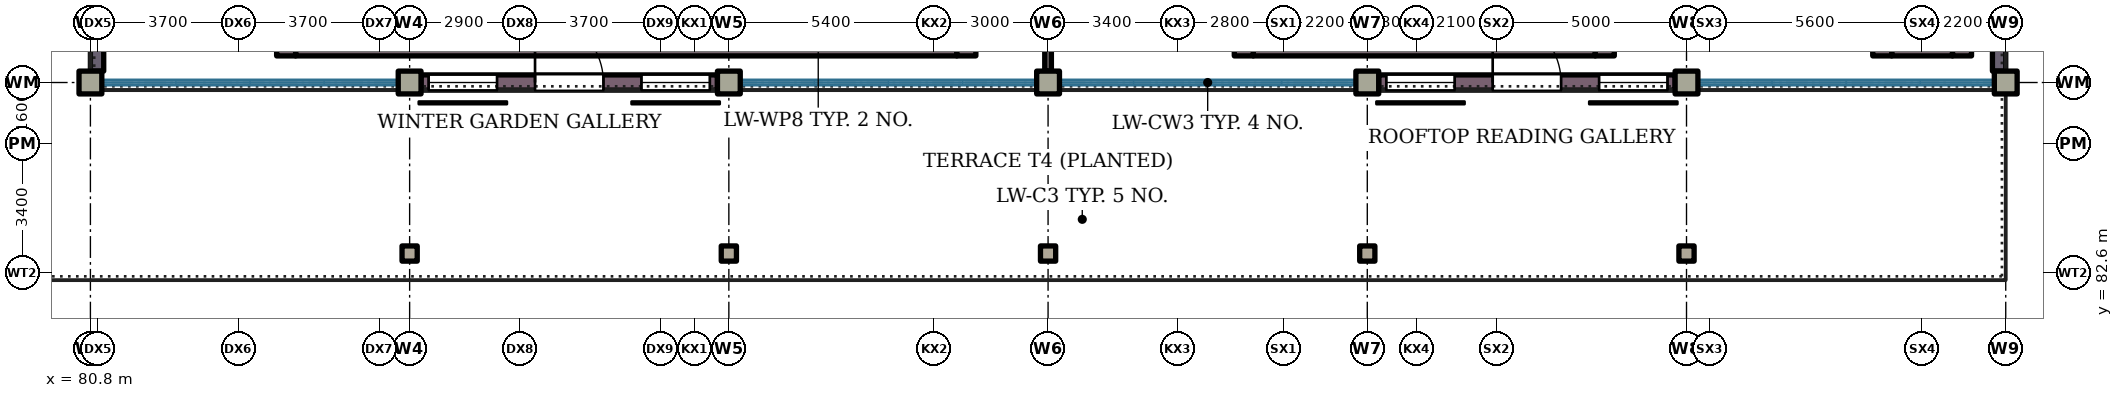
"""IFC4 building model, lengths in metres.
Left out: names, types, materials, properties, quantities, classifications, styles, units other than length and angle.
Written with IfcOpenShell. Run it as: python <this file> out.ifc"""

import sys

from ifc_helpers import new_model, si_unit, direction, frame, frame_2d, origin, origin_2d, place, context, subcontext, project, spatial, rectangle, extrude, element, fill, save


model = new_model("IFC4")
c1 = context("Model", 3, precision=1e-05, world=origin(), true_north=direction((0.0, 1.0)))
c2 = subcontext(c1, "Body", "Model", "MODEL_VIEW")
j1 = project(units=[si_unit("LENGTHUNIT", "METRE"), si_unit("PLANEANGLEUNIT", "RADIAN")], contexts=[c1])
p1 = place(None, origin())
s1 = spatial("IfcSite", under=j1, at=p1, CompositionType="ELEMENT")
p2 = place(p1, origin())
s2 = spatial("IfcBuilding", under=s1, at=p2, CompositionType="ELEMENT")
p3 = place(p2, frame((0.0, 0.0, 16.8)))
s3 = spatial("IfcBuildingStorey", under=s2, at=p3, CompositionType="ELEMENT", Elevation=16.8)
for number, where, z_axis, x_axis in (
    (1, (80.8, 87.6, 0.0), (0.0, 0.0, 1.0), (1.0, 0.0, 0.0)),
    (2, (89.2, 87.6, 0.0), (0.0, 0.0, 1.0), (1.0, 0.0, 0.0)),
    (3, (97.6, 87.6, 0.0), (0.0, 0.0, 1.0), (1.0, 0.0, 0.0)),
    (4, (106.0, 87.6, 0.0), (0.0, 0.0, 1.0), (1.0, 0.0, 0.0)),
    (5, (114.4, 87.6, 0.0), (0.0, 0.0, 1.0), (1.0, 0.0, 0.0)),
    (6, (122.8, 87.6, 0.0), (0.0, 0.0, 1.0), (1.0, 0.0, 0.0)),
    (7, (131.2, 87.6, 0.0), (0.0, 0.0, 1.0), (1.0, 0.0, 0.0)),
):
    element("IfcColumn", number, at=place(p3, frame(where, z_axis=z_axis, x_axis=x_axis)), inside=s3, PredefinedType="COLUMN", context=c2, shape_type="SweptSolid", body=[
        extrude(rectangle(XDim=0.6, YDim=0.6, at=origin_2d()), origin(), (0.0, 0.0, 1.0), 4.2),
    ])
p4 = place(p3, frame((80.975, 87.9, 0.0), z_axis=(0.0, 0.0, 1.0), x_axis=(0.0, 1.0, 0.0)))
e8 = element("IfcWall", 8, at=p4, inside=s3, PredefinedType="SHEAR", context=c2, shape_type="SweptSolid", body=[
    extrude(rectangle(XDim=9.6, YDim=0.35, at=frame_2d((4.8, 0.0))), origin(), (0.0, 0.0, 1.0), 4.2),
])
p5 = place(p4, frame((5.3, 0.0, 0.9)))
e9 = element("IfcOpeningElement", 9, at=p5, cuts=e8, PredefinedType="OPENING", context=c2, shape_type="SweptSolid", body=[
    extrude(rectangle(XDim=1.8, YDim=2.1, at=frame_2d((0.9, 1.05))), frame((0.0, 0.185, 0.0), z_axis=(0.0, -1.0, 0.0), x_axis=(1.0, 0.0, 0.0)), (0.0, 0.0, 1.0), 0.37),
])
p6 = place(p3, frame((131.025, 97.5, 0.0), z_axis=(0.0, 0.0, 1.0), x_axis=(0.0, -1.0, 0.0)))
e10 = element("IfcWall", 10, at=p6, inside=s3, PredefinedType="SHEAR", context=c2, shape_type="SweptSolid", body=[
    extrude(rectangle(XDim=9.6, YDim=0.35, at=frame_2d((4.8, 0.0))), origin(), (0.0, 0.0, 1.0), 4.2),
])
p7 = place(p3, frame((89.5, 87.6, 0.0), z_axis=(0.0, 0.0, 1.0), x_axis=(1.0, 0.0, 0.0)))
e11 = element("IfcWall", 11, at=p7, inside=s3, PredefinedType="SOLIDWALL", context=c2, shape_type="SweptSolid", body=[
    extrude(rectangle(XDim=7.8, YDim=0.4, at=frame_2d((3.9, 0.0))), origin(), (0.0, 0.0, 1.0), 3.3),
])
p8 = place(p7, frame((3.0, 0.0, 0.0)))
e12 = element("IfcOpeningElement", 12, at=p8, cuts=e11, PredefinedType="OPENING", context=c2, shape_type="SweptSolid", body=[
    extrude(rectangle(XDim=1.8, YDim=2.4, at=frame_2d((0.9, 1.2))), frame((0.0, 0.21, 0.0), z_axis=(0.0, -1.0, 0.0), x_axis=(1.0, 0.0, 0.0)), (0.0, 0.0, 1.0), 0.42),
])
p9 = place(p7, frame((0.2, 0.0, 0.9)))
e13 = element("IfcOpeningElement", 13, at=p9, cuts=e11, PredefinedType="OPENING", context=c2, shape_type="SweptSolid", body=[
    extrude(rectangle(XDim=1.8, YDim=1.9, at=frame_2d((0.9, 0.95))), frame((0.0, 0.21, 0.0), z_axis=(0.0, -1.0, 0.0), x_axis=(1.0, 0.0, 0.0)), (0.0, 0.0, 1.0), 0.42),
])
p10 = place(p7, frame((5.8, 0.0, 0.9)))
e14 = element("IfcOpeningElement", 14, at=p10, cuts=e11, PredefinedType="OPENING", context=c2, shape_type="SweptSolid", body=[
    extrude(rectangle(XDim=1.8, YDim=1.9, at=frame_2d((0.9, 0.95))), frame((0.0, 0.21, 0.0), z_axis=(0.0, -1.0, 0.0), x_axis=(1.0, 0.0, 0.0)), (0.0, 0.0, 1.0), 0.42),
])
p11 = place(p3, frame((114.7, 87.6, 0.0), z_axis=(0.0, 0.0, 1.0), x_axis=(1.0, 0.0, 0.0)))
e15 = element("IfcWall", 15, at=p11, inside=s3, PredefinedType="SOLIDWALL", context=c2, shape_type="SweptSolid", body=[
    extrude(rectangle(XDim=7.8, YDim=0.4, at=frame_2d((3.9, 0.0))), origin(), (0.0, 0.0, 1.0), 3.3),
])
p12 = place(p11, frame((3.0, 0.0, 0.0)))
e16 = element("IfcOpeningElement", 16, at=p12, cuts=e15, PredefinedType="OPENING", context=c2, shape_type="SweptSolid", body=[
    extrude(rectangle(XDim=1.8, YDim=2.4, at=frame_2d((0.9, 1.2))), frame((0.0, 0.21, 0.0), z_axis=(0.0, -1.0, 0.0), x_axis=(1.0, 0.0, 0.0)), (0.0, 0.0, 1.0), 0.42),
])
p13 = place(p11, frame((0.2, 0.0, 0.9)))
e17 = element("IfcOpeningElement", 17, at=p13, cuts=e15, PredefinedType="OPENING", context=c2, shape_type="SweptSolid", body=[
    extrude(rectangle(XDim=1.8, YDim=1.9, at=frame_2d((0.9, 0.95))), frame((0.0, 0.21, 0.0), z_axis=(0.0, -1.0, 0.0), x_axis=(1.0, 0.0, 0.0)), (0.0, 0.0, 1.0), 0.42),
])
p14 = place(p11, frame((5.8, 0.0, 0.9)))
e18 = element("IfcOpeningElement", 18, at=p14, cuts=e15, PredefinedType="OPENING", context=c2, shape_type="SweptSolid", body=[
    extrude(rectangle(XDim=1.8, YDim=1.9, at=frame_2d((0.9, 0.95))), frame((0.0, 0.21, 0.0), z_axis=(0.0, -1.0, 0.0), x_axis=(1.0, 0.0, 0.0)), (0.0, 0.0, 1.0), 0.42),
])
p15 = place(p3, frame((128.2, 88.55, 4.2), z_axis=(0.0, 0.0, 1.0), x_axis=(1.0, 0.0, 0.0)))
e19 = element("IfcWall", 19, at=p15, inside=s3, PredefinedType="SOLIDWALL", context=c2, shape_type="SweptSolid", body=[
    extrude(rectangle(XDim=1.6, YDim=0.5, at=frame_2d((0.8, 0.0))), origin(), (0.0, 0.0, 1.0), 0.9),
])
for number, where, z_axis, x_axis in (
    (20, (127.95, 88.3, 4.2), (0.0, 0.0, 1.0), (0.0, 1.0, 0.0)),
    (21, (130.05, 88.3, 4.2), (0.0, 0.0, 1.0), (0.0, 1.0, 0.0)),
):
    element("IfcWall", number, at=place(p3, frame(where, z_axis=z_axis, x_axis=x_axis)), inside=s3, PredefinedType="SOLIDWALL", context=c2, shape_type="SweptSolid", body=[
        extrude(rectangle(XDim=8.8, YDim=0.5, at=frame_2d((4.4, 0.0))), origin(), (0.0, 0.0, 1.0), 0.9),
    ])
p16 = place(p3, frame((111.4, 88.55, 4.2), z_axis=(0.0, 0.0, 1.0), x_axis=(1.0, 0.0, 0.0)))
e22 = element("IfcWall", 22, at=p16, inside=s3, PredefinedType="SOLIDWALL", context=c2, shape_type="SweptSolid", body=[
    extrude(rectangle(XDim=9.0, YDim=0.5, at=frame_2d((4.5, 0.0))), origin(), (0.0, 0.0, 1.0), 0.9),
])
for number, where, z_axis, x_axis in (
    (23, (111.15, 88.3, 4.2), (0.0, 0.0, 1.0), (0.0, 1.0, 0.0)),
    (24, (120.65, 88.3, 4.2), (0.0, 0.0, 1.0), (0.0, 1.0, 0.0)),
):
    element("IfcWall", number, at=place(p3, frame(where, z_axis=z_axis, x_axis=x_axis)), inside=s3, PredefinedType="SOLIDWALL", context=c2, shape_type="SweptSolid", body=[
        extrude(rectangle(XDim=8.8, YDim=0.5, at=frame_2d((4.4, 0.0))), origin(), (0.0, 0.0, 1.0), 0.9),
    ])
p17 = place(p3, frame((86.2, 88.55, 4.2), z_axis=(0.0, 0.0, 1.0), x_axis=(1.0, 0.0, 0.0)))
e25 = element("IfcWall", 25, at=p17, inside=s3, PredefinedType="SOLIDWALL", context=c2, shape_type="SweptSolid", body=[
    extrude(rectangle(XDim=17.4, YDim=0.5, at=frame_2d((8.7, 0.0))), origin(), (0.0, 0.0, 1.0), 0.9),
])
for number, where, z_axis, x_axis in (
    (26, (85.95, 88.3, 4.2), (0.0, 0.0, 1.0), (0.0, 1.0, 0.0)),
    (27, (103.85, 88.3, 4.2), (0.0, 0.0, 1.0), (0.0, 1.0, 0.0)),
):
    element("IfcWall", number, at=place(p3, frame(where, z_axis=z_axis, x_axis=x_axis)), inside=s3, PredefinedType="SOLIDWALL", context=c2, shape_type="SweptSolid", body=[
        extrude(rectangle(XDim=8.8, YDim=0.5, at=frame_2d((4.4, 0.0))), origin(), (0.0, 0.0, 1.0), 0.9),
    ])
for number, where, z_axis, x_axis in (
    (28, (89.2, 83.1, 0.0), (0.0, 0.0, 1.0), (1.0, 0.0, 0.0)),
    (29, (97.6, 83.1, 0.0), (0.0, 0.0, 1.0), (1.0, 0.0, 0.0)),
    (30, (106.0, 83.1, 0.0), (0.0, 0.0, 1.0), (1.0, 0.0, 0.0)),
    (31, (114.4, 83.1, 0.0), (0.0, 0.0, 1.0), (1.0, 0.0, 0.0)),
    (32, (122.8, 83.1, 0.0), (0.0, 0.0, 1.0), (1.0, 0.0, 0.0)),
):
    element("IfcColumn", number, at=place(p3, frame(where, z_axis=z_axis, x_axis=x_axis)), inside=s3, PredefinedType="COLUMN", context=c2, shape_type="SweptSolid", body=[
        extrude(rectangle(XDim=0.4, YDim=0.4, at=origin_2d()), origin(), (0.0, 0.0, 1.0), 2.6),
    ])
p18 = place(p3, frame((106.0, 87.9, 0.0), z_axis=(0.0, 0.0, 1.0), x_axis=(0.0, 1.0, 0.0)))
e33 = element("IfcWall", 33, at=p18, inside=s3, PredefinedType="PARTITIONING", context=c2, shape_type="SweptSolid", body=[
    extrude(rectangle(XDim=2.5, YDim=0.175, at=frame_2d((1.25, 0.0))), origin(), (0.0, 0.0, 1.0), 3.0),
])
p19 = place(p8, origin())
e34 = element("IfcDoor", 34, at=p19, inside=s3, OperationType="DOUBLE_DOOR_SINGLE_SWING", PredefinedType="DOOR", context=c2, shape_type="SweptSolid", body=[
    extrude(rectangle(XDim=1.8, YDim=2.4, at=frame_2d((0.9, 1.2))), frame((0.0, 0.025, 0.0), z_axis=(0.0, -1.0, 0.0), x_axis=(1.0, 0.0, 0.0)), (0.0, 0.0, 1.0), 0.05),
])
fill(e12, e34)
p20 = place(p9, origin())
e35 = element("IfcWindow", 35, at=p20, inside=s3, PartitioningType="SINGLE_PANEL", PredefinedType="WINDOW", context=c2, shape_type="SweptSolid", body=[
    extrude(rectangle(XDim=1.8, YDim=1.9, at=frame_2d((0.9, 0.95))), frame((0.0, 0.03, 0.0), z_axis=(0.0, -1.0, 0.0), x_axis=(1.0, 0.0, 0.0)), (0.0, 0.0, 1.0), 0.06),
])
fill(e13, e35)
p21 = place(p10, origin())
e36 = element("IfcWindow", 36, at=p21, inside=s3, PartitioningType="SINGLE_PANEL", PredefinedType="WINDOW", context=c2, shape_type="SweptSolid", body=[
    extrude(rectangle(XDim=1.8, YDim=1.9, at=frame_2d((0.9, 0.95))), frame((0.0, 0.03, 0.0), z_axis=(0.0, -1.0, 0.0), x_axis=(1.0, 0.0, 0.0)), (0.0, 0.0, 1.0), 0.06),
])
fill(e14, e36)
p22 = place(p12, origin())
e37 = element("IfcDoor", 37, at=p22, inside=s3, OperationType="DOUBLE_DOOR_SINGLE_SWING", PredefinedType="DOOR", context=c2, shape_type="SweptSolid", body=[
    extrude(rectangle(XDim=1.8, YDim=2.4, at=frame_2d((0.9, 1.2))), frame((0.0, 0.025, 0.0), z_axis=(0.0, -1.0, 0.0), x_axis=(1.0, 0.0, 0.0)), (0.0, 0.0, 1.0), 0.05),
])
fill(e16, e37)
p23 = place(p13, origin())
e38 = element("IfcWindow", 38, at=p23, inside=s3, PartitioningType="SINGLE_PANEL", PredefinedType="WINDOW", context=c2, shape_type="SweptSolid", body=[
    extrude(rectangle(XDim=1.8, YDim=1.9, at=frame_2d((0.9, 0.95))), frame((0.0, 0.03, 0.0), z_axis=(0.0, -1.0, 0.0), x_axis=(1.0, 0.0, 0.0)), (0.0, 0.0, 1.0), 0.06),
])
fill(e17, e38)
p24 = place(p14, origin())
e39 = element("IfcWindow", 39, at=p24, inside=s3, PartitioningType="SINGLE_PANEL", PredefinedType="WINDOW", context=c2, shape_type="SweptSolid", body=[
    extrude(rectangle(XDim=1.8, YDim=1.9, at=frame_2d((0.9, 0.95))), frame((0.0, 0.03, 0.0), z_axis=(0.0, -1.0, 0.0), x_axis=(1.0, 0.0, 0.0)), (0.0, 0.0, 1.0), 0.06),
])
fill(e18, e39)
save(model, sys.argv[1])
